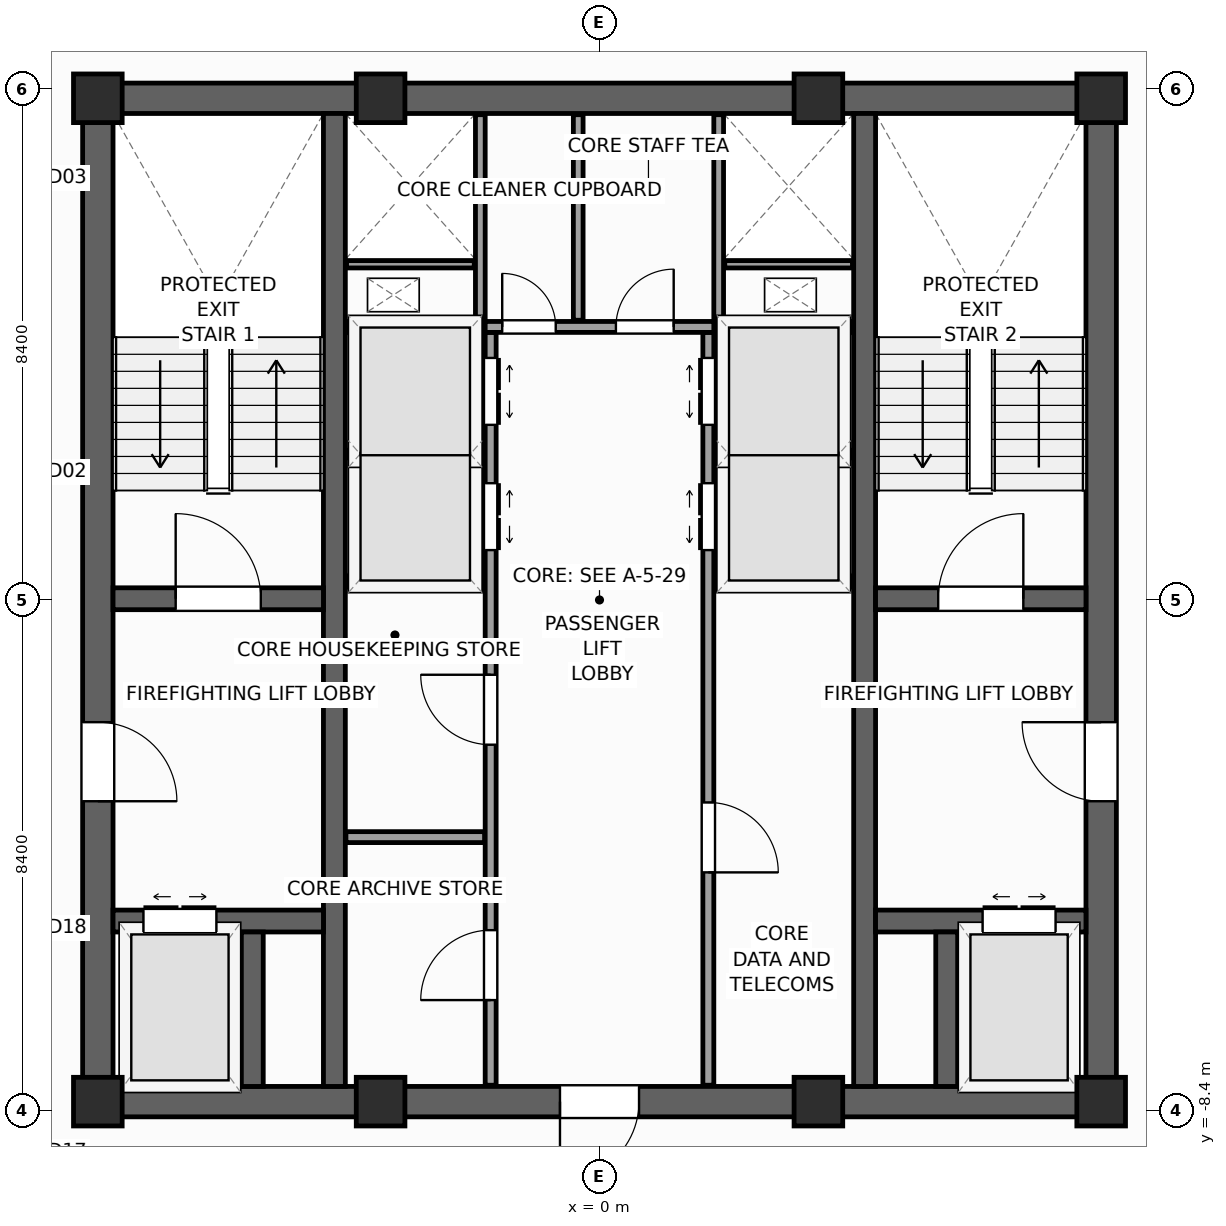
"""IFC4 building model, lengths in metres.
Left out: names, types, materials, properties, quantities, classifications, styles, units other than length and angle.
Written with IfcOpenShell. Run it as: python <this file> out.ifc"""

import sys

from ifc_helpers import new_model, si_unit, direction, frame, frame_2d, origin, origin_2d, place, context, subcontext, project, spatial, rectangle, extrude, source, transform, mapped, element, fill, save


model = new_model("IFC4")
c1 = context("Model", 3, precision=1e-05, world=origin(), true_north=direction((0.0, 1.0)))
c2 = subcontext(c1, "Body", "Model", "MODEL_VIEW")
j1 = project(units=[si_unit("LENGTHUNIT", "METRE"), si_unit("PLANEANGLEUNIT", "RADIAN")], contexts=[c1])
p1 = place(None, origin())
s1 = spatial("IfcSite", under=j1, at=p1, CompositionType="ELEMENT")
p2 = place(p1, origin())
s2 = spatial("IfcBuilding", under=s1, at=p2, CompositionType="ELEMENT")
p3 = place(p2, frame((0.0, 0.0, 272.4)))
s3 = spatial("IfcBuildingStorey", under=s2, at=p3, CompositionType="ELEMENT", Elevation=272.4)
p4 = place(p3, frame((-8.5, -8.25, 0.0), z_axis=(0.0, 0.0, 1.0), x_axis=(1.0, 0.0, 0.0)))
e1 = element("IfcWall", 1, at=p4, inside=s3, PredefinedType="SHEAR", context=c2, shape_type="SweptSolid", body=[
    extrude(rectangle(XDim=17.0, YDim=0.5, at=frame_2d((8.5, 0.0))), origin(), (0.0, 0.0, 1.0), 3.6),
])
p5 = place(p4, frame((7.85, 0.0, 0.0)))
e2 = element("IfcOpeningElement", 2, at=p5, cuts=e1, PredefinedType="OPENING", context=c2, shape_type="SweptSolid", body=[
    extrude(rectangle(XDim=1.3, YDim=2.2, at=frame_2d((0.65, 1.1))), frame((0.0, 0.26, 0.0), z_axis=(0.0, -1.0, 0.0), x_axis=(1.0, 0.0, 0.0)), (0.0, 0.0, 1.0), 0.52),
])
p6 = place(p3, frame((-8.5, 8.25, 0.0), z_axis=(0.0, 0.0, 1.0), x_axis=(1.0, 0.0, 0.0)))
e3 = element("IfcWall", 3, at=p6, inside=s3, PredefinedType="SHEAR", context=c2, shape_type="SweptSolid", body=[
    extrude(rectangle(XDim=17.0, YDim=0.5, at=frame_2d((8.5, 0.0))), origin(), (0.0, 0.0, 1.0), 3.6),
])
p7 = place(p3, frame((-8.25, -8.0, 0.0), z_axis=(0.0, 0.0, 1.0), x_axis=(0.0, 1.0, 0.0)))
e4 = element("IfcWall", 4, at=p7, inside=s3, PredefinedType="SHEAR", context=c2, shape_type="SweptSolid", body=[
    extrude(rectangle(XDim=16.0, YDim=0.5, at=frame_2d((8.0, 0.0))), origin(), (0.0, 0.0, 1.0), 3.6),
])
p8 = place(p7, frame((4.69, 0.0, 0.0)))
e5 = element("IfcOpeningElement", 5, at=p8, cuts=e4, PredefinedType="OPENING", context=c2, shape_type="SweptSolid", body=[
    extrude(rectangle(XDim=1.3, YDim=2.2, at=frame_2d((0.65, 1.1))), frame((0.0, 0.26, 0.0), z_axis=(0.0, -1.0, 0.0), x_axis=(1.0, 0.0, 0.0)), (0.0, 0.0, 1.0), 0.52),
])
p9 = place(p3, frame((8.25, -8.0, 0.0), z_axis=(0.0, 0.0, 1.0), x_axis=(0.0, 1.0, 0.0)))
e6 = element("IfcWall", 6, at=p9, inside=s3, PredefinedType="SHEAR", context=c2, shape_type="SweptSolid", body=[
    extrude(rectangle(XDim=16.0, YDim=0.5, at=frame_2d((8.0, 0.0))), origin(), (0.0, 0.0, 1.0), 3.6),
])
p10 = place(p9, frame((4.69, 0.0, 0.0)))
e7 = element("IfcOpeningElement", 7, at=p10, cuts=e6, PredefinedType="OPENING", context=c2, shape_type="SweptSolid", body=[
    extrude(rectangle(XDim=1.3, YDim=2.2, at=frame_2d((0.65, 1.1))), frame((0.0, 0.26, 0.0), z_axis=(0.0, -1.0, 0.0), x_axis=(1.0, 0.0, 0.0)), (0.0, 0.0, 1.0), 0.52),
])
for number, where, z_axis, x_axis in (
    (8, (-4.36, -8.0, 0.0), (0.0, 0.0, 1.0), (0.0, 1.0, 0.0)),
    (9, (4.36, -8.0, 0.0), (0.0, 0.0, 1.0), (0.0, 1.0, 0.0)),
):
    element("IfcWall", number, at=place(p3, frame(where, z_axis=z_axis, x_axis=x_axis)), inside=s3, PredefinedType="SHEAR", context=c2, shape_type="SweptSolid", body=[
        extrude(rectangle(XDim=16.0, YDim=0.36, at=frame_2d((8.0, 0.0))), origin(), (0.0, 0.0, 1.0), 3.6),
    ])
p11 = place(p3, frame((-8.0, 0.02, 0.0), z_axis=(0.0, 0.0, 1.0), x_axis=(1.0, 0.0, 0.0)))
e10 = element("IfcWall", 10, at=p11, inside=s3, PredefinedType="SHEAR", context=c2, shape_type="SweptSolid", body=[
    extrude(rectangle(XDim=3.46, YDim=0.36, at=frame_2d((1.73, 0.0))), origin(), (0.0, 0.0, 1.0), 3.6),
])
p12 = place(p11, frame((1.03, 0.0, 0.0)))
e11 = element("IfcOpeningElement", 11, at=p12, cuts=e10, PredefinedType="OPENING", context=c2, shape_type="SweptSolid", body=[
    extrude(rectangle(XDim=1.4, YDim=2.2, at=frame_2d((0.7, 1.1))), frame((0.0, 0.19, 0.0), z_axis=(0.0, -1.0, 0.0), x_axis=(1.0, 0.0, 0.0)), (0.0, 0.0, 1.0), 0.38),
])
p13 = place(p3, frame((4.54, 0.02, 0.0), z_axis=(0.0, 0.0, 1.0), x_axis=(1.0, 0.0, 0.0)))
e12 = element("IfcWall", 12, at=p13, inside=s3, PredefinedType="SHEAR", context=c2, shape_type="SweptSolid", body=[
    extrude(rectangle(XDim=3.46, YDim=0.36, at=frame_2d((1.73, 0.0))), origin(), (0.0, 0.0, 1.0), 3.6),
])
p14 = place(p13, frame((1.03, 0.0, 0.0)))
e13 = element("IfcOpeningElement", 13, at=p14, cuts=e12, PredefinedType="OPENING", context=c2, shape_type="SweptSolid", body=[
    extrude(rectangle(XDim=1.4, YDim=2.2, at=frame_2d((0.7, 1.1))), frame((0.0, 0.19, 0.0), z_axis=(0.0, -1.0, 0.0), x_axis=(1.0, 0.0, 0.0)), (0.0, 0.0, 1.0), 0.38),
])
p15 = place(p3, frame((-8.0, -5.28, 0.0), z_axis=(0.0, 0.0, 1.0), x_axis=(1.0, 0.0, 0.0)))
e14 = element("IfcWall", 14, at=p15, inside=s3, PredefinedType="SHEAR", context=c2, shape_type="SweptSolid", body=[
    extrude(rectangle(XDim=3.46, YDim=0.36, at=frame_2d((1.73, 0.0))), origin(), (0.0, 0.0, 1.0), 3.6),
])
p16 = place(p15, frame((0.5, 0.0, 0.0)))
e15 = element("IfcOpeningElement", 15, at=p16, cuts=e14, PredefinedType="OPENING", context=c2, shape_type="SweptSolid", body=[
    extrude(rectangle(XDim=1.2, YDim=2.25, at=frame_2d((0.6, 1.125))), frame((0.0, 0.19, 0.0), z_axis=(0.0, -1.0, 0.0), x_axis=(1.0, 0.0, 0.0)), (0.0, 0.0, 1.0), 0.38),
])
p17 = place(p3, frame((4.54, -5.28, 0.0), z_axis=(0.0, 0.0, 1.0), x_axis=(1.0, 0.0, 0.0)))
e16 = element("IfcWall", 16, at=p17, inside=s3, PredefinedType="SHEAR", context=c2, shape_type="SweptSolid", body=[
    extrude(rectangle(XDim=3.46, YDim=0.36, at=frame_2d((1.73, 0.0))), origin(), (0.0, 0.0, 1.0), 3.6),
])
p18 = place(p17, frame((1.76, 0.0, 0.0)))
e17 = element("IfcOpeningElement", 17, at=p18, cuts=e16, PredefinedType="OPENING", context=c2, shape_type="SweptSolid", body=[
    extrude(rectangle(XDim=1.2, YDim=2.25, at=frame_2d((0.6, 1.125))), frame((0.0, 0.19, 0.0), z_axis=(0.0, -1.0, 0.0), x_axis=(1.0, 0.0, 0.0)), (0.0, 0.0, 1.0), 0.38),
])
for number, where, z_axis, x_axis in (
    (18, (-5.71, -8.0, 0.0), (0.0, 0.0, 1.0), (0.0, 1.0, 0.0)),
    (19, (5.71, -8.0, 0.0), (0.0, 0.0, 1.0), (0.0, 1.0, 0.0)),
):
    element("IfcWall", number, at=place(p3, frame(where, z_axis=z_axis, x_axis=x_axis)), inside=s3, PredefinedType="SHEAR", context=c2, shape_type="SweptSolid", body=[
        extrude(rectangle(XDim=2.54, YDim=0.36, at=frame_2d((1.27, 0.0))), origin(), (0.0, 0.0, 1.0), 3.6),
    ])
m1 = source(origin(), c2, "Body", "SweptSolid", [
    extrude(rectangle(XDim=0.8, YDim=0.8, at=origin_2d()), origin(), (0.0, 0.0, 1.0), 3.6),
])
for number, where, z_axis, x_axis in (
    (20, (-8.25, -8.25, 0.0), (0.0, 0.0, 1.0), (1.0, 0.0, 0.0)),
    (21, (8.25, -8.25, 0.0), (0.0, 0.0, 1.0), (1.0, 0.0, 0.0)),
    (22, (8.25, 8.25, 0.0), (0.0, 0.0, 1.0), (1.0, 0.0, 0.0)),
    (23, (-8.25, 8.25, 0.0), (0.0, 0.0, 1.0), (1.0, 0.0, 0.0)),
    (24, (-3.6, -8.25, 0.0), (0.0, 0.0, 1.0), (1.0, 0.0, 0.0)),
    (25, (3.6, -8.25, 0.0), (0.0, 0.0, 1.0), (1.0, 0.0, 0.0)),
    (26, (-3.6, 8.25, 0.0), (0.0, 0.0, 1.0), (1.0, 0.0, 0.0)),
    (27, (3.6, 8.25, 0.0), (0.0, 0.0, 1.0), (1.0, 0.0, 0.0)),
):
    element("IfcColumn", number, at=place(p3, frame(where, z_axis=z_axis, x_axis=x_axis)), inside=s3, PredefinedType="PILASTER", context=c2, shape_type="MappedRepresentation", body=[
        mapped(m1, transform((0.0, 0.0, 0.0), scale=1.0)),
    ])
p19 = place(p3, frame((-1.79, -7.98, 0.0), z_axis=(0.0, 0.0, 1.0), x_axis=(0.0, 1.0, 0.0)))
e28 = element("IfcWall", 28, at=p19, inside=s3, PredefinedType="PARTITIONING", context=c2, shape_type="SweptSolid", body=[
    extrude(rectangle(XDim=12.38, YDim=0.18, at=frame_2d((6.19, 0.0))), origin(), (0.0, 0.0, 1.0), 3.35),
])
p20 = place(p19, frame((8.8, 0.0, 0.0)))
e29 = element("IfcOpeningElement", 29, at=p20, cuts=e28, PredefinedType="OPENING", context=c2, shape_type="SweptSolid", body=[
    extrude(rectangle(XDim=1.1, YDim=2.2, at=frame_2d((0.55, 1.1))), frame((0.0, 0.1, 0.0), z_axis=(0.0, -1.0, 0.0), x_axis=(1.0, 0.0, 0.0)), (0.0, 0.0, 1.0), 0.2),
])
p21 = place(p19, frame((10.86, 0.0, 0.0)))
e30 = element("IfcOpeningElement", 30, at=p21, cuts=e28, PredefinedType="OPENING", context=c2, shape_type="SweptSolid", body=[
    extrude(rectangle(XDim=1.1, YDim=2.2, at=frame_2d((0.55, 1.1))), frame((0.0, 0.1, 0.0), z_axis=(0.0, -1.0, 0.0), x_axis=(1.0, 0.0, 0.0)), (0.0, 0.0, 1.0), 0.2),
])
p22 = place(p19, frame((1.4, 0.0, 0.0)))
e31 = element("IfcOpeningElement", 31, at=p22, cuts=e28, PredefinedType="OPENING", context=c2, shape_type="SweptSolid", body=[
    extrude(rectangle(XDim=1.15, YDim=2.25, at=frame_2d((0.575, 1.125))), frame((0.0, 0.1, 0.0), z_axis=(0.0, -1.0, 0.0), x_axis=(1.0, 0.0, 0.0)), (0.0, 0.0, 1.0), 0.2),
])
p23 = place(p19, frame((5.6, 0.0, 0.0)))
e32 = element("IfcOpeningElement", 32, at=p23, cuts=e28, PredefinedType="OPENING", context=c2, shape_type="SweptSolid", body=[
    extrude(rectangle(XDim=1.15, YDim=2.25, at=frame_2d((0.575, 1.125))), frame((0.0, 0.1, 0.0), z_axis=(0.0, -1.0, 0.0), x_axis=(1.0, 0.0, 0.0)), (0.0, 0.0, 1.0), 0.2),
])
p24 = place(p3, frame((1.79, -7.98, 0.0), z_axis=(0.0, 0.0, 1.0), x_axis=(0.0, 1.0, 0.0)))
e33 = element("IfcWall", 33, at=p24, inside=s3, PredefinedType="PARTITIONING", context=c2, shape_type="SweptSolid", body=[
    extrude(rectangle(XDim=12.38, YDim=0.18, at=frame_2d((6.19, 0.0))), origin(), (0.0, 0.0, 1.0), 3.35),
])
p25 = place(p24, frame((8.8, 0.0, 0.0)))
e34 = element("IfcOpeningElement", 34, at=p25, cuts=e33, PredefinedType="OPENING", context=c2, shape_type="SweptSolid", body=[
    extrude(rectangle(XDim=1.1, YDim=2.2, at=frame_2d((0.55, 1.1))), frame((0.0, 0.1, 0.0), z_axis=(0.0, -1.0, 0.0), x_axis=(1.0, 0.0, 0.0)), (0.0, 0.0, 1.0), 0.2),
])
p26 = place(p24, frame((10.86, 0.0, 0.0)))
e35 = element("IfcOpeningElement", 35, at=p26, cuts=e33, PredefinedType="OPENING", context=c2, shape_type="SweptSolid", body=[
    extrude(rectangle(XDim=1.1, YDim=2.2, at=frame_2d((0.55, 1.1))), frame((0.0, 0.1, 0.0), z_axis=(0.0, -1.0, 0.0), x_axis=(1.0, 0.0, 0.0)), (0.0, 0.0, 1.0), 0.2),
])
p27 = place(p24, frame((3.5, 0.0, 0.0)))
e36 = element("IfcOpeningElement", 36, at=p27, cuts=e33, PredefinedType="OPENING", context=c2, shape_type="SweptSolid", body=[
    extrude(rectangle(XDim=1.15, YDim=2.25, at=frame_2d((0.575, 1.125))), frame((0.0, 0.1, 0.0), z_axis=(0.0, -1.0, 0.0), x_axis=(1.0, 0.0, 0.0)), (0.0, 0.0, 1.0), 0.2),
])
p28 = place(p3, frame((-1.88, 4.49, 0.0), z_axis=(0.0, 0.0, 1.0), x_axis=(1.0, 0.0, 0.0)))
e37 = element("IfcWall", 37, at=p28, inside=s3, PredefinedType="PARTITIONING", context=c2, shape_type="SweptSolid", body=[
    extrude(rectangle(XDim=3.76, YDim=0.18, at=frame_2d((1.88, 0.0))), origin(), (0.0, 0.0, 1.0), 3.35),
])
p29 = place(p28, frame((0.28, 0.0, 0.0)))
e38 = element("IfcOpeningElement", 38, at=p29, cuts=e37, PredefinedType="OPENING", context=c2, shape_type="SweptSolid", body=[
    extrude(rectangle(XDim=0.88, YDim=2.1, at=frame_2d((0.44, 1.05))), frame((0.0, 0.1, 0.0), z_axis=(0.0, -1.0, 0.0), x_axis=(1.0, 0.0, 0.0)), (0.0, 0.0, 1.0), 0.2),
])
p30 = place(p28, frame((2.15, 0.0, 0.0)))
e39 = element("IfcOpeningElement", 39, at=p30, cuts=e37, PredefinedType="OPENING", context=c2, shape_type="SweptSolid", body=[
    extrude(rectangle(XDim=0.95, YDim=2.1, at=frame_2d((0.475, 1.05))), frame((0.0, 0.1, 0.0), z_axis=(0.0, -1.0, 0.0), x_axis=(1.0, 0.0, 0.0)), (0.0, 0.0, 1.0), 0.2),
])
for number, where, z_axis, x_axis in (
    (40, (-4.17, -3.9, 0.0), (0.0, 0.0, 1.0), (1.0, 0.0, 0.0)),
    (41, (-4.17, 0.3, 0.0), (0.0, 0.0, 1.0), (1.0, 0.0, 0.0)),
    (42, (1.89, 0.3, 0.0), (0.0, 0.0, 1.0), (1.0, 0.0, 0.0)),
    (43, (-4.17, 4.49, 0.0), (0.0, 0.0, 1.0), (1.0, 0.0, 0.0)),
    (44, (1.89, 4.49, 0.0), (0.0, 0.0, 1.0), (1.0, 0.0, 0.0)),
):
    element("IfcWall", number, at=place(p3, frame(where, z_axis=z_axis, x_axis=x_axis)), inside=s3, PredefinedType="PARTITIONING", context=c2, shape_type="SweptSolid", body=[
        extrude(rectangle(XDim=2.28, YDim=0.18, at=frame_2d((1.14, 0.0))), origin(), (0.0, 0.0, 1.0), 3.35),
    ])
for number, where, z_axis, x_axis in (
    (45, (-4.16, 2.4, 0.0), (0.0, 0.0, 1.0), (1.0, 0.0, 0.0)),
    (46, (1.9, 2.4, 0.0), (0.0, 0.0, 1.0), (1.0, 0.0, 0.0)),
):
    element("IfcWall", number, at=place(p3, frame(where, z_axis=z_axis, x_axis=x_axis)), inside=s3, PredefinedType="PARTITIONING", context=c2, shape_type="SweptSolid", body=[
        extrude(rectangle(XDim=2.26, YDim=0.12, at=frame_2d((1.13, 0.0))), origin(), (0.0, 0.0, 1.0), 3.35),
    ])
for number, where, z_axis, x_axis in (
    (47, (-1.96, 4.58, 0.0), (0.0, 0.0, 1.0), (0.0, 1.0, 0.0)),
    (48, (1.96, 4.58, 0.0), (0.0, 0.0, 1.0), (0.0, 1.0, 0.0)),
):
    element("IfcWall", number, at=place(p3, frame(where, z_axis=z_axis, x_axis=x_axis)), inside=s3, PredefinedType="PARTITIONING", context=c2, shape_type="SweptSolid", body=[
        extrude(rectangle(XDim=3.4, YDim=0.16, at=frame_2d((1.7, 0.0))), origin(), (0.0, 0.0, 1.0), 3.35),
    ])
for number, where, z_axis, x_axis in (
    (49, (-4.16, 5.52, 0.0), (0.0, 0.0, 1.0), (1.0, 0.0, 0.0)),
    (50, (2.06, 5.52, 0.0), (0.0, 0.0, 1.0), (1.0, 0.0, 0.0)),
):
    element("IfcWall", number, at=place(p3, frame(where, z_axis=z_axis, x_axis=x_axis)), inside=s3, PredefinedType="PARTITIONING", context=c2, shape_type="SweptSolid", body=[
        extrude(rectangle(XDim=2.1, YDim=0.12, at=frame_2d((1.05, 0.0))), origin(), (0.0, 0.0, 1.0), 3.35),
    ])
p31 = place(p3, frame((-0.35, 4.6, 0.0), z_axis=(0.0, 0.0, 1.0), x_axis=(0.0, 1.0, 0.0)))
e51 = element("IfcWall", 51, at=p31, inside=s3, PredefinedType="PARTITIONING", context=c2, shape_type="SweptSolid", body=[
    extrude(rectangle(XDim=3.38, YDim=0.16, at=frame_2d((1.69, 0.0))), origin(), (0.0, 0.0, 1.0), 3.35),
])
m2 = source(origin(), c2, "Body", "SweptSolid", [
    extrude(rectangle(XDim=1.4, YDim=2.2, at=frame_2d((0.7, 1.1))), frame((0.0, 0.025, 0.0), z_axis=(0.0, -1.0, 0.0), x_axis=(1.0, 0.0, 0.0)), (0.0, 0.0, 1.0), 0.05),
])
p32 = place(p12, origin())
e52 = element("IfcDoor", 52, at=p32, inside=s3, OperationType="SINGLE_SWING_LEFT", PredefinedType="DOOR", context=c2, shape_type="MappedRepresentation", body=[
    mapped(m2, transform((0.0, 0.0, 0.0), scale=1.0)),
])
fill(e11, e52)
p33 = place(p14, origin())
e53 = element("IfcDoor", 53, at=p33, inside=s3, OperationType="SINGLE_SWING_RIGHT", PredefinedType="DOOR", context=c2, shape_type="MappedRepresentation", body=[
    mapped(m2, transform((0.0, 0.0, 0.0), scale=1.0)),
])
fill(e13, e53)
m3 = source(origin(), c2, "Body", "SweptSolid", [
    extrude(rectangle(XDim=1.3, YDim=2.2, at=frame_2d((0.65, 1.1))), frame((0.0, 0.025, 0.0), z_axis=(0.0, -1.0, 0.0), x_axis=(1.0, 0.0, 0.0)), (0.0, 0.0, 1.0), 0.05),
])
p34 = place(p8, frame((1.3, 0.0, 0.0), z_axis=(0.0, 0.0, 1.0), x_axis=(-1.0, 0.0, 0.0)))
e54 = element("IfcDoor", 54, at=p34, inside=s3, OperationType="SINGLE_SWING_LEFT", PredefinedType="DOOR", context=c2, shape_type="MappedRepresentation", body=[
    mapped(m3, transform((0.0, 0.0, 0.0), scale=1.0)),
])
fill(e5, e54)
p35 = place(p10, origin())
e55 = element("IfcDoor", 55, at=p35, inside=s3, OperationType="SINGLE_SWING_RIGHT", PredefinedType="DOOR", context=c2, shape_type="MappedRepresentation", body=[
    mapped(m3, transform((0.0, 0.0, 0.0), scale=1.0)),
])
fill(e7, e55)
p36 = place(p5, frame((1.3, 0.0, 0.0), z_axis=(0.0, 0.0, 1.0), x_axis=(-1.0, 0.0, 0.0)))
e56 = element("IfcDoor", 56, at=p36, inside=s3, OperationType="SINGLE_SWING_LEFT", PredefinedType="DOOR", context=c2, shape_type="MappedRepresentation", body=[
    mapped(m3, transform((0.0, 0.0, 0.0), scale=1.0)),
])
fill(e2, e56)
m4 = source(origin(), c2, "Body", "SweptSolid", [
    extrude(rectangle(XDim=1.2, YDim=2.25, at=frame_2d((0.6, 1.125))), frame((0.0, 0.025, 0.0), z_axis=(0.0, -1.0, 0.0), x_axis=(1.0, 0.0, 0.0)), (0.0, 0.0, 1.0), 0.05),
])
p37 = place(p16, origin())
e57 = element("IfcDoor", 57, at=p37, inside=s3, OperationType="DOUBLE_DOOR_SLIDING", PredefinedType="DOOR", context=c2, shape_type="MappedRepresentation", body=[
    mapped(m4, transform((0.0, 0.0, 0.0), scale=1.0)),
])
fill(e15, e57)
p38 = place(p18, origin())
e58 = element("IfcDoor", 58, at=p38, inside=s3, OperationType="DOUBLE_DOOR_SLIDING", PredefinedType="DOOR", context=c2, shape_type="MappedRepresentation", body=[
    mapped(m4, transform((0.0, 0.0, 0.0), scale=1.0)),
])
fill(e17, e58)
m5 = source(origin(), c2, "Body", "SweptSolid", [
    extrude(rectangle(XDim=1.1, YDim=2.2, at=frame_2d((0.55, 1.1))), frame((0.0, 0.025, 0.0), z_axis=(0.0, -1.0, 0.0), x_axis=(1.0, 0.0, 0.0)), (0.0, 0.0, 1.0), 0.05),
])
p39 = place(p20, frame((1.1, 0.0, 0.0), z_axis=(0.0, 0.0, 1.0), x_axis=(-1.0, 0.0, 0.0)))
e59 = element("IfcDoor", 59, at=p39, inside=s3, OperationType="DOUBLE_DOOR_SLIDING", PredefinedType="DOOR", context=c2, shape_type="MappedRepresentation", body=[
    mapped(m5, transform((0.0, 0.0, 0.0), scale=1.0)),
])
fill(e29, e59)
p40 = place(p21, frame((1.1, 0.0, 0.0), z_axis=(0.0, 0.0, 1.0), x_axis=(-1.0, 0.0, 0.0)))
e60 = element("IfcDoor", 60, at=p40, inside=s3, OperationType="DOUBLE_DOOR_SLIDING", PredefinedType="DOOR", context=c2, shape_type="MappedRepresentation", body=[
    mapped(m5, transform((0.0, 0.0, 0.0), scale=1.0)),
])
fill(e30, e60)
p41 = place(p25, origin())
e61 = element("IfcDoor", 61, at=p41, inside=s3, OperationType="DOUBLE_DOOR_SLIDING", PredefinedType="DOOR", context=c2, shape_type="MappedRepresentation", body=[
    mapped(m5, transform((0.0, 0.0, 0.0), scale=1.0)),
])
fill(e34, e61)
p42 = place(p26, origin())
e62 = element("IfcDoor", 62, at=p42, inside=s3, OperationType="DOUBLE_DOOR_SLIDING", PredefinedType="DOOR", context=c2, shape_type="MappedRepresentation", body=[
    mapped(m5, transform((0.0, 0.0, 0.0), scale=1.0)),
])
fill(e35, e62)
m6 = source(origin(), c2, "Body", "SweptSolid", [
    extrude(rectangle(XDim=1.15, YDim=2.25, at=frame_2d((0.575, 1.125))), frame((0.0, 0.025, 0.0), z_axis=(0.0, -1.0, 0.0), x_axis=(1.0, 0.0, 0.0)), (0.0, 0.0, 1.0), 0.05),
])
p43 = place(p22, origin())
e63 = element("IfcDoor", 63, at=p43, inside=s3, OperationType="SINGLE_SWING_LEFT", PredefinedType="DOOR", context=c2, shape_type="MappedRepresentation", body=[
    mapped(m6, transform((0.0, 0.0, 0.0), scale=1.0)),
])
fill(e31, e63)
p44 = place(p23, origin())
e64 = element("IfcDoor", 64, at=p44, inside=s3, OperationType="SINGLE_SWING_RIGHT", PredefinedType="DOOR", context=c2, shape_type="MappedRepresentation", body=[
    mapped(m6, transform((0.0, 0.0, 0.0), scale=1.0)),
])
fill(e32, e64)
p45 = place(p27, frame((1.15, 0.0, 0.0), z_axis=(0.0, 0.0, 1.0), x_axis=(-1.0, 0.0, 0.0)))
e65 = element("IfcDoor", 65, at=p45, inside=s3, OperationType="SINGLE_SWING_LEFT", PredefinedType="DOOR", context=c2, shape_type="MappedRepresentation", body=[
    mapped(m6, transform((0.0, 0.0, 0.0), scale=1.0)),
])
fill(e36, e65)
m7 = source(origin(), c2, "Body", "SweptSolid", [
    extrude(rectangle(XDim=0.88, YDim=2.1, at=frame_2d((0.44, 1.05))), frame((0.0, 0.025, 0.0), z_axis=(0.0, -1.0, 0.0), x_axis=(1.0, 0.0, 0.0)), (0.0, 0.0, 1.0), 0.05),
])
p46 = place(p29, origin())
e66 = element("IfcDoor", 66, at=p46, inside=s3, OperationType="SINGLE_SWING_LEFT", PredefinedType="DOOR", context=c2, shape_type="MappedRepresentation", body=[
    mapped(m7, transform((0.0, 0.0, 0.0), scale=1.0)),
])
fill(e38, e66)
m8 = source(origin(), c2, "Body", "SweptSolid", [
    extrude(rectangle(XDim=0.95, YDim=2.1, at=frame_2d((0.475, 1.05))), frame((0.0, 0.025, 0.0), z_axis=(0.0, -1.0, 0.0), x_axis=(1.0, 0.0, 0.0)), (0.0, 0.0, 1.0), 0.05),
])
p47 = place(p30, origin())
e67 = element("IfcDoor", 67, at=p47, inside=s3, OperationType="SINGLE_SWING_RIGHT", PredefinedType="DOOR", context=c2, shape_type="MappedRepresentation", body=[
    mapped(m8, transform((0.0, 0.0, 0.0), scale=1.0)),
])
fill(e39, e67)
save(model, sys.argv[1])
